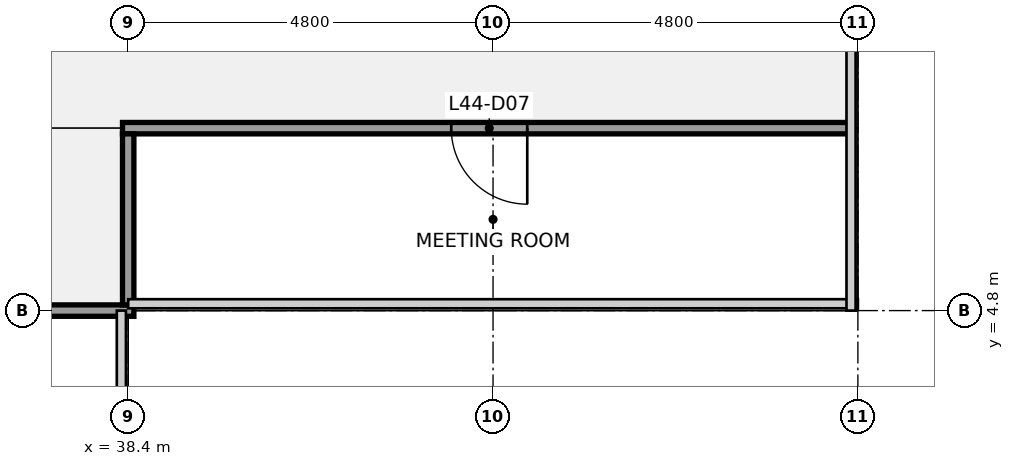
"""IFC4 building model, lengths in metres.
Left out: names, types, materials, properties, quantities, classifications, styles, units other than length and angle.
Written with IfcOpenShell. Run it as: python <this file> out.ifc"""

import sys

from ifc_helpers import new_model, si_unit, direction, frame, frame_2d, origin, place, context, subcontext, project, spatial, rectangle, extrude, element, fill, save


model = new_model("IFC4")
c1 = context("Model", 3, precision=1e-05, world=origin(), true_north=direction((0.0, 1.0)))
c2 = subcontext(c1, "Body", "Model", "MODEL_VIEW")
j1 = project(units=[si_unit("LENGTHUNIT", "METRE"), si_unit("PLANEANGLEUNIT", "RADIAN")], contexts=[c1])
p1 = place(None, origin())
s1 = spatial("IfcSite", under=j1, at=p1, CompositionType="ELEMENT")
p2 = place(p1, origin())
s2 = spatial("IfcBuilding", under=s1, at=p2, CompositionType="ELEMENT")
p3 = place(p2, frame((0.0, 0.0, 205.2)))
s3 = spatial("IfcBuildingStorey", under=s2, at=p3, CompositionType="ELEMENT", Elevation=205.2)
p4 = place(p3, frame((19.125, 4.8, 0.0), z_axis=(0.0, 0.0, 1.0), x_axis=(1.0, 0.0, 0.0)))
e1 = element("IfcWall", 1, at=p4, inside=s3, PredefinedType="PARTITIONING", context=c2, shape_type="SweptSolid", body=[
    extrude(rectangle(XDim=19.35, YDim=0.15, at=frame_2d((9.675, 0.0))), origin(), (0.0, 0.0, 1.0), 2.849),
])
p5 = place(p4, frame((4.375, 0.0, 0.0)))
e2 = element("IfcOpeningElement", 2, at=p5, cuts=e1, PredefinedType="OPENING", context=c2, shape_type="SweptSolid", body=[
    extrude(rectangle(XDim=1.0, YDim=2.1, at=frame_2d((0.5, 1.05))), frame((0.0, 0.085, 0.0), z_axis=(0.0, -1.0, 0.0), x_axis=(1.0, 0.0, 0.0)), (0.0, 0.0, 1.0), 0.17),
])
p6 = place(p4, frame((13.975, 0.0, 0.0)))
e3 = element("IfcOpeningElement", 3, at=p6, cuts=e1, PredefinedType="OPENING", context=c2, shape_type="SweptSolid", body=[
    extrude(rectangle(XDim=1.0, YDim=2.1, at=frame_2d((0.5, 1.05))), frame((0.0, 0.085, 0.0), z_axis=(0.0, -1.0, 0.0), x_axis=(1.0, 0.0, 0.0)), (0.0, 0.0, 1.0), 0.17),
])
p7 = place(p3, frame((38.325, 7.2, 0.0), z_axis=(0.0, 0.0, 1.0), x_axis=(1.0, 0.0, 0.0)))
e4 = element("IfcWall", 4, at=p7, inside=s3, PredefinedType="PARTITIONING", context=c2, shape_type="SweptSolid", body=[
    extrude(rectangle(XDim=9.575, YDim=0.15, at=frame_2d((4.788, 0.0))), origin(), (0.0, 0.0, 1.0), 2.849),
])
p8 = place(p7, frame((4.325, 0.0, 0.0)))
e5 = element("IfcOpeningElement", 5, at=p8, cuts=e4, PredefinedType="OPENING", context=c2, shape_type="SweptSolid", body=[
    extrude(rectangle(XDim=1.0, YDim=2.1, at=frame_2d((0.5, 1.05))), frame((0.0, 0.085, 0.0), z_axis=(0.0, -1.0, 0.0), x_axis=(1.0, 0.0, 0.0)), (0.0, 0.0, 1.0), 0.17),
])
p9 = place(p3, frame((38.4, 4.875, 0.0), z_axis=(0.0, 0.0, 1.0), x_axis=(0.0, 1.0, 0.0)))
e6 = element("IfcWall", 6, at=p9, inside=s3, PredefinedType="PARTITIONING", context=c2, shape_type="SweptSolid", body=[
    extrude(rectangle(XDim=2.25, YDim=0.15, at=frame_2d((1.125, 0.0))), origin(), (0.0, 0.0, 1.0), 2.849),
])
p10 = place(p8, origin())
e7 = element("IfcDoor", 7, at=p10, inside=s3, OperationType="SINGLE_SWING_RIGHT", PredefinedType="DOOR", context=c2, shape_type="SweptSolid", body=[
    extrude(rectangle(XDim=1.0, YDim=2.1, at=frame_2d((0.5, 1.05))), frame((0.0, 0.025, 0.0), z_axis=(0.0, -1.0, 0.0), x_axis=(1.0, 0.0, 0.0)), (0.0, 0.0, 1.0), 0.05),
])
fill(e5, e7)
save(model, sys.argv[1])
